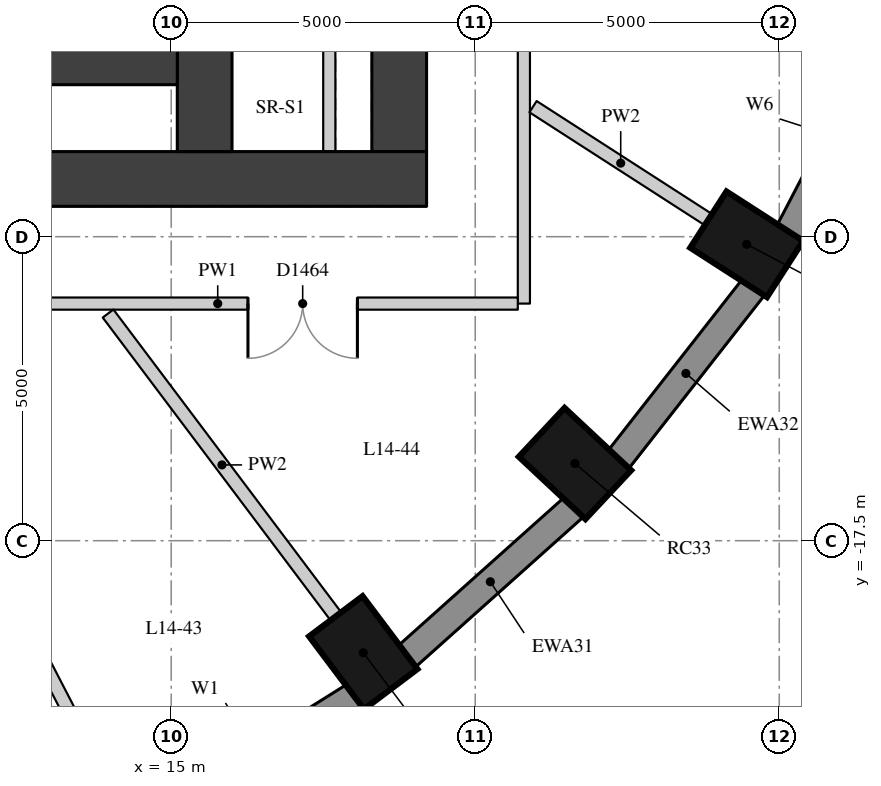
"""IFC4 building model, lengths in metres.
Left out: names, types, materials, properties, quantities, classifications, styles, units other than length and angle.
Written with IfcOpenShell. Run it as: python <this file> out.ifc"""

import sys

from ifc_helpers import new_model, si_unit, direction, frame, frame_2d, origin, origin_2d, place, context, subcontext, project, spatial, rectangle, extrude, element, fill, save


model = new_model("IFC4")
c1 = context("Model", 3, precision=1e-05, world=origin(), true_north=direction((0.0, 1.0)))
c2 = subcontext(c1, "Body", "Model", "MODEL_VIEW")
j1 = project(units=[si_unit("LENGTHUNIT", "METRE"), si_unit("PLANEANGLEUNIT", "RADIAN")], contexts=[c1])
p1 = place(None, origin())
s1 = spatial("IfcSite", under=j1, at=p1, CompositionType="ELEMENT")
p2 = place(p1, origin())
s2 = spatial("IfcBuilding", under=s1, at=p2, CompositionType="ELEMENT")
p3 = place(p2, frame((0.0, 0.0, 54.7)))
s3 = spatial("IfcBuildingStorey", under=s2, at=p3, CompositionType="ELEMENT", Elevation=54.7)
for number, where, z_axis, x_axis in (
    (1, (18.159, -19.343, 0.0), (0.0, 0.0, 1.0), (0.601, -0.799, 0.0)),
    (2, (21.641, -16.23, 0.0), (0.0, 0.0, 1.0), (0.73, -0.683, 0.0)),
    (3, (24.465, -12.625, 0.0), (0.0, 0.0, 1.0), (0.841, -0.541, 0.0)),
):
    element("IfcColumn", number, at=place(p3, frame(where, z_axis=z_axis, x_axis=x_axis)), inside=s3, PredefinedType="COLUMN", context=c2, shape_type="SweptSolid", body=[
        extrude(rectangle(XDim=1.5, YDim=1.1, at=origin_2d()), origin(), (0.0, 0.0, 1.0), 3.3),
    ])
p4 = place(p3, frame((14.817, -22.051, 0.0), z_axis=(0.0, 0.0, 1.0), x_axis=(0.847635480093, 0.530579016629, 0.0)))
e4 = element("IfcWall", 4, at=p4, inside=s3, PredefinedType="SOLIDWALL", context=c2, shape_type="SweptSolid", body=[
    extrude(rectangle(XDim=3.782, YDim=0.45, at=frame_2d((1.891, 0.0))), origin(), (0.0, 0.0, 1.0), 3.02),
])
p5 = place(p4, frame((0.791, 0.0, 0.4)))
e5 = element("IfcOpeningElement", 5, at=p5, cuts=e4, PredefinedType="OPENING", context=c2, shape_type="SweptSolid", body=[
    extrude(rectangle(XDim=2.2, YDim=1.75, at=frame_2d((1.1, 0.875))), frame((0.0, 0.235, 0.0), z_axis=(0.0, -1.0, 0.0), x_axis=(1.0, 0.0, 0.0)), (0.0, 0.0, 1.0), 0.47),
])
p6 = place(p3, frame((18.871, -19.407, 0.0), z_axis=(0.0, 0.0, 1.0), x_axis=(0.745526233716, 0.66647628228, 0.0)))
e6 = element("IfcWall", 6, at=p6, inside=s3, PredefinedType="SOLIDWALL", context=c2, shape_type="SweptSolid", body=[
    extrude(rectangle(XDim=3.697, YDim=0.45, at=frame_2d((1.848, 0.0))), origin(), (0.0, 0.0, 1.0), 3.02),
])
p7 = place(p3, frame((22.352, -16.17, 0.0), z_axis=(0.0, 0.0, 1.0), x_axis=(0.616661975264, 0.787228053529, 0.0)))
e7 = element("IfcWall", 7, at=p7, inside=s3, PredefinedType="SOLIDWALL", context=c2, shape_type="SweptSolid", body=[
    extrude(rectangle(XDim=3.61, YDim=0.45, at=frame_2d((1.805, 0.0))), origin(), (0.0, 0.0, 1.0), 3.02),
])
p8 = place(p3, frame((25.152, -12.437, 0.0), z_axis=(0.0, 0.0, 1.0), x_axis=(0.462492775226, 0.886623050041, 0.0)))
e8 = element("IfcWall", 8, at=p8, inside=s3, PredefinedType="SOLIDWALL", context=c2, shape_type="SweptSolid", body=[
    extrude(rectangle(XDim=3.532, YDim=0.45, at=frame_2d((1.766, 0.0))), origin(), (0.0, 0.0, 1.0), 3.02),
])
p9 = place(p8, frame((1.466, 0.0, 0.4)))
e9 = element("IfcOpeningElement", 9, at=p9, cuts=e8, PredefinedType="OPENING", context=c2, shape_type="SweptSolid", body=[
    extrude(rectangle(XDim=0.6, YDim=1.75, at=frame_2d((0.3, 0.875))), frame((0.0, 0.235, 0.0), z_axis=(0.0, -1.0, 0.0), x_axis=(1.0, 0.0, 0.0)), (0.0, 0.0, 1.0), 0.47),
])
p10 = place(p3, frame((18.75, -11.1, 0.0), z_axis=(0.0, 0.0, 1.0), x_axis=(0.0, 1.0, 0.0)))
e10 = element("IfcWall", 10, at=p10, inside=s3, PredefinedType="SHEAR", context=c2, shape_type="SweptSolid", body=[
    extrude(rectangle(XDim=22.2, YDim=0.9, at=frame_2d((11.1, 0.0))), origin(), (0.0, 0.0, 1.0), 3.02),
])
p11 = place(p10, frame((15.925, 0.0, 0.0)))
e11 = element("IfcOpeningElement", 11, at=p11, cuts=e10, PredefinedType="OPENING", context=c2, shape_type="SweptSolid", body=[
    extrude(rectangle(XDim=1.5, YDim=2.1, at=frame_2d((0.75, 1.05))), frame((0.0, 0.46, 0.0), z_axis=(0.0, -1.0, 0.0), x_axis=(1.0, 0.0, 0.0)), (0.0, 0.0, 1.0), 0.92),
])
p12 = place(p10, frame((4.525, 0.0, 0.0)))
e12 = element("IfcOpeningElement", 12, at=p12, cuts=e10, PredefinedType="OPENING", context=c2, shape_type="SweptSolid", body=[
    extrude(rectangle(XDim=1.5, YDim=2.1, at=frame_2d((0.75, 1.05))), frame((0.0, 0.46, 0.0), z_axis=(0.0, -1.0, 0.0), x_axis=(1.0, 0.0, 0.0)), (0.0, 0.0, 1.0), 0.92),
])
p13 = place(p3, frame((4.0, -11.55, 0.0), z_axis=(0.0, 0.0, 1.0), x_axis=(1.0, 0.0, 0.0)))
e13 = element("IfcWall", 13, at=p13, inside=s3, PredefinedType="SHEAR", context=c2, shape_type="SweptSolid", body=[
    extrude(rectangle(XDim=15.2, YDim=0.9, at=frame_2d((7.6, 0.0))), origin(), (0.0, 0.0, 1.0), 3.02),
])
p14 = place(p3, frame((15.55, -11.1, 0.0), z_axis=(0.0, 0.0, 1.0), x_axis=(0.0, 1.0, 0.0)))
e14 = element("IfcWall", 14, at=p14, inside=s3, PredefinedType="SHEAR", context=c2, shape_type="SweptSolid", body=[
    extrude(rectangle(XDim=22.2, YDim=0.9, at=frame_2d((11.1, 0.0))), origin(), (0.0, 0.0, 1.0), 3.02),
])
p15 = place(p14, frame((15.6, 0.0, 0.0)))
e15 = element("IfcOpeningElement", 15, at=p15, cuts=e14, PredefinedType="OPENING", context=c2, shape_type="SweptSolid", body=[
    extrude(rectangle(XDim=1.0, YDim=2.1, at=frame_2d((0.5, 1.05))), frame((0.0, 0.46, 0.0), z_axis=(0.0, -1.0, 0.0), x_axis=(1.0, 0.0, 0.0)), (0.0, 0.0, 1.0), 0.92),
])
p16 = place(p14, frame((5.6, 0.0, 0.0)))
e16 = element("IfcOpeningElement", 16, at=p16, cuts=e14, PredefinedType="OPENING", context=c2, shape_type="SweptSolid", body=[
    extrude(rectangle(XDim=1.0, YDim=2.1, at=frame_2d((0.5, 1.05))), frame((0.0, 0.46, 0.0), z_axis=(0.0, -1.0, 0.0), x_axis=(1.0, 0.0, 0.0)), (0.0, 0.0, 1.0), 0.92),
])
p17 = place(p3, frame((4.9, -9.55, 0.0), z_axis=(0.0, 0.0, 1.0), x_axis=(1.0, 0.0, 0.0)))
e17 = element("IfcWall", 17, at=p17, inside=s3, PredefinedType="SHEAR", context=c2, shape_type="SweptSolid", body=[
    extrude(rectangle(XDim=10.2, YDim=0.9, at=frame_2d((5.1, 0.0))), origin(), (0.0, 0.0, 1.0), 3.02),
])
p18 = place(p3, frame((17.6, -11.1, 0.0), z_axis=(0.0, 0.0, 1.0), x_axis=(0.0, 1.0, 0.0)))
e18 = element("IfcWall", 18, at=p18, inside=s3, PredefinedType="PARTITIONING", context=c2, shape_type="SweptSolid", body=[
    extrude(rectangle(XDim=3.7, YDim=0.2, at=frame_2d((1.85, 0.0))), origin(), (0.0, 0.0, 1.0), 3.02),
])
p19 = place(p3, frame((20.8, 13.5, 0.0), z_axis=(0.0, 0.0, 1.0), x_axis=(0.0, -1.0, 0.0)))
e19 = element("IfcWall", 19, at=p19, inside=s3, PredefinedType="PARTITIONING", context=c2, shape_type="SweptSolid", body=[
    extrude(rectangle(XDim=27.1, YDim=0.2, at=frame_2d((13.55, 0.0))), origin(), (0.0, 0.0, 1.0), 3.02),
])
p20 = place(p19, frame((17.733, 0.0, 0.0)))
e20 = element("IfcOpeningElement", 20, at=p20, cuts=e19, PredefinedType="OPENING", context=c2, shape_type="SweptSolid", body=[
    extrude(rectangle(XDim=1.8, YDim=2.1, at=frame_2d((0.9, 1.05))), frame((0.0, 0.11, 0.0), z_axis=(0.0, -1.0, 0.0), x_axis=(1.0, 0.0, 0.0)), (0.0, 0.0, 1.0), 0.22),
])
p21 = place(p19, frame((9.448, 0.0, 0.0)))
e21 = element("IfcOpeningElement", 21, at=p21, cuts=e19, PredefinedType="OPENING", context=c2, shape_type="SweptSolid", body=[
    extrude(rectangle(XDim=1.8, YDim=2.1, at=frame_2d((0.9, 1.05))), frame((0.0, 0.11, 0.0), z_axis=(0.0, -1.0, 0.0), x_axis=(1.0, 0.0, 0.0)), (0.0, 0.0, 1.0), 0.22),
])
p22 = place(p19, frame((2.704, 0.0, 0.0)))
e22 = element("IfcOpeningElement", 22, at=p22, cuts=e19, PredefinedType="OPENING", context=c2, shape_type="SweptSolid", body=[
    extrude(rectangle(XDim=1.8, YDim=2.1, at=frame_2d((0.9, 1.05))), frame((0.0, 0.11, 0.0), z_axis=(0.0, -1.0, 0.0), x_axis=(1.0, 0.0, 0.0)), (0.0, 0.0, 1.0), 0.22),
])
p23 = place(p3, frame((20.7, -13.6, 0.0), z_axis=(0.0, 0.0, 1.0), x_axis=(-1.0, 0.0, 0.0)))
e23 = element("IfcWall", 23, at=p23, inside=s3, PredefinedType="PARTITIONING", context=c2, shape_type="SweptSolid", body=[
    extrude(rectangle(XDim=9.87, YDim=0.2, at=frame_2d((4.935, 0.0))), origin(), (0.0, 0.0, 1.0), 3.02),
])
p24 = place(p23, frame((7.909, 0.0, 0.0)))
e24 = element("IfcOpeningElement", 24, at=p24, cuts=e23, PredefinedType="OPENING", context=c2, shape_type="SweptSolid", body=[
    extrude(rectangle(XDim=0.9, YDim=2.1, at=frame_2d((0.45, 1.05))), frame((0.0, 0.11, 0.0), z_axis=(0.0, -1.0, 0.0), x_axis=(1.0, 0.0, 0.0)), (0.0, 0.0, 1.0), 0.22),
])
p25 = place(p23, frame((2.638, 0.0, 0.0)))
e25 = element("IfcOpeningElement", 25, at=p25, cuts=e23, PredefinedType="OPENING", context=c2, shape_type="SweptSolid", body=[
    extrude(rectangle(XDim=1.8, YDim=2.1, at=frame_2d((0.9, 1.05))), frame((0.0, 0.11, 0.0), z_axis=(0.0, -1.0, 0.0), x_axis=(1.0, 0.0, 0.0)), (0.0, 0.0, 1.0), 0.22),
])
p26 = place(p3, frame((13.78, -21.201, 0.0), z_axis=(0.0, 0.0, 1.0), x_axis=(-0.459685115008, 0.888081975405, 0.0)))
e26 = element("IfcWall", 26, at=p26, inside=s3, PredefinedType="PARTITIONING", context=c2, shape_type="SweptSolid", body=[
    extrude(rectangle(XDim=8.131, YDim=0.22, at=frame_2d((4.065, 0.0))), origin(), (0.0, 0.0, 1.0), 3.02),
])
p27 = place(p3, frame((17.708, -18.743, 0.0), z_axis=(0.0, 0.0, 1.0), x_axis=(-0.601177883261, 0.799115231164, 0.0)))
e27 = element("IfcWall", 27, at=p27, inside=s3, PredefinedType="PARTITIONING", context=c2, shape_type="SweptSolid", body=[
    extrude(rectangle(XDim=6.231, YDim=0.22, at=frame_2d((3.116, 0.0))), origin(), (0.0, 0.0, 1.0), 3.02),
])
p28 = place(p3, frame((23.835, -12.219, 0.0), z_axis=(0.0, 0.0, 1.0), x_axis=(-0.840694872373, 0.541509124176, 0.0)))
e28 = element("IfcWall", 28, at=p28, inside=s3, PredefinedType="PARTITIONING", context=c2, shape_type="SweptSolid", body=[
    extrude(rectangle(XDim=3.43, YDim=0.22, at=frame_2d((1.715, 0.0))), origin(), (0.0, 0.0, 1.0), 3.02),
])
p29 = place(p25, origin())
e29 = element("IfcDoor", 29, at=p29, inside=s3, OperationType="DOUBLE_DOOR_SINGLE_SWING", PredefinedType="DOOR", context=c2, shape_type="SweptSolid", body=[
    extrude(rectangle(XDim=1.8, YDim=2.1, at=frame_2d((0.9, 1.05))), frame((0.0, 0.025, 0.0), z_axis=(0.0, -1.0, 0.0), x_axis=(1.0, 0.0, 0.0)), (0.0, 0.0, 1.0), 0.05),
])
fill(e25, e29)
save(model, sys.argv[1])
